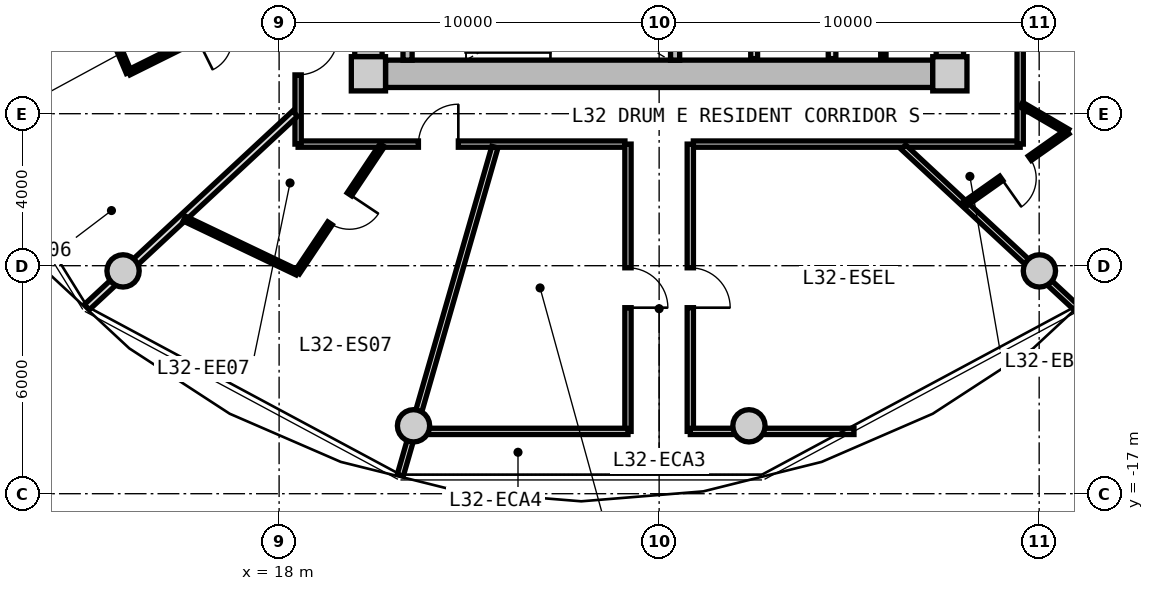
"""IFC4 building model, lengths in metres.
Left out: names, types, materials, properties, quantities, classifications, styles, units other than length and angle.
Written with IfcOpenShell. Run it as: python <this file> out.ifc"""

import sys

from ifc_helpers import new_model, si_unit, direction, frame, frame_2d, origin, origin_2d, place, context, subcontext, project, spatial, rectangle, circle, extrude, source, transform, mapped, element, fill, save


model = new_model("IFC4")
c1 = context("Model", 3, precision=1e-05, world=origin(), true_north=direction((0.0, 1.0)))
c2 = subcontext(c1, "Body", "Model", "MODEL_VIEW")
j1 = project(units=[si_unit("LENGTHUNIT", "METRE"), si_unit("PLANEANGLEUNIT", "RADIAN")], contexts=[c1])
p1 = place(None, origin())
s1 = spatial("IfcSite", under=j1, at=p1, CompositionType="ELEMENT")
p2 = place(p1, origin())
s2 = spatial("IfcBuilding", under=s1, at=p2, CompositionType="ELEMENT")
p3 = place(p2, frame((0.0, 0.0, 105.4)))
s3 = spatial("IfcBuildingStorey", under=s2, at=p3, CompositionType="ELEMENT", Elevation=105.4)
m1 = source(origin(), c2, "Body", "SweptSolid", [
    extrude(rectangle(XDim=0.9, YDim=0.9, at=origin_2d()), origin(), (0.0, 0.0, 1.0), 3.05),
])
for number, where, z_axis, x_axis in (
    (1, (20.35, -5.95, 0.0), (0.0, 0.0, 1.0), (1.0, 0.0, 0.0)),
    (2, (35.65, -5.95, 0.0), (0.0, 0.0, 1.0), (1.0, 0.0, 0.0)),
):
    element("IfcColumn", number, at=place(p3, frame(where, z_axis=z_axis, x_axis=x_axis)), inside=s3, PredefinedType="COLUMN", context=c2, shape_type="MappedRepresentation", body=[
        mapped(m1, transform((0.0, 0.0, 0.0), x_axis=(1.0, 0.0, 0.0), y_axis=(0.0, 1.0, 0.0), z_axis=(0.0, 0.0, 1.0), scale=1.0)),
    ])
m2 = source(origin(), c2, "Body", "SweptSolid", [
    extrude(rectangle(XDim=14.4, YDim=0.72, at=frame_2d((7.2, 0.0))), origin(), (0.0, 0.0, 1.0), 2.79),
])
p4 = place(p3, frame((35.2, -5.95, 0.0), z_axis=(0.0, 0.0, 1.0), x_axis=(-1.0, 0.0, 0.0)))
e3 = element("IfcWall", 3, at=p4, inside=s3, PredefinedType="SHEAR", context=c2, shape_type="MappedRepresentation", body=[
    mapped(m2, transform((0.0, 0.0, 0.0), x_axis=(1.0, 0.0, 0.0), y_axis=(0.0, 1.0, 0.0), z_axis=(0.0, 0.0, 1.0), scale=1.0)),
])
m3 = source(origin(), c2, "Body", "SweptSolid", [
    extrude(rectangle(XDim=11.0, YDim=0.72, at=frame_2d((5.5, 0.0))), origin(), (0.0, 0.0, 1.0), 2.79),
])
p5 = place(p3, frame((20.35, -5.5, 0.0), z_axis=(0.0, 0.0, 1.0), x_axis=(0.0, 1.0, 0.0)))
e4 = element("IfcWall", 4, at=p5, inside=s3, PredefinedType="SHEAR", context=c2, shape_type="MappedRepresentation", body=[
    mapped(m3, transform((0.0, 0.0, 0.0), x_axis=(1.0, 0.0, 0.0), y_axis=(0.0, 1.0, 0.0), z_axis=(0.0, 0.0, 1.0), scale=1.0)),
])
p6 = place(p5, frame((3.8, 0.0, 0.0)))
e5 = element("IfcOpeningElement", 5, at=p6, cuts=e4, PredefinedType="OPENING", context=c2, shape_type="SweptSolid", body=[
    extrude(rectangle(XDim=1.2, YDim=2.15, at=frame_2d((0.6, 1.075))), frame((0.0, 0.37, 0.0), z_axis=(0.0, -1.0, 0.0), x_axis=(1.0, 0.0, 0.0)), (0.0, 0.0, 1.0), 0.74),
])
p7 = place(p3, frame((35.65, 5.5, 0.0), z_axis=(0.0, 0.0, 1.0), x_axis=(0.0, -1.0, 0.0)))
e6 = element("IfcWall", 6, at=p7, inside=s3, PredefinedType="SHEAR", context=c2, shape_type="MappedRepresentation", body=[
    mapped(m3, transform((0.0, 0.0, 0.0), x_axis=(1.0, 0.0, 0.0), y_axis=(0.0, 1.0, 0.0), z_axis=(0.0, 0.0, 1.0), scale=1.0)),
])
p8 = place(p7, frame((5.65, 0.0, 0.0)))
e7 = element("IfcOpeningElement", 7, at=p8, cuts=e6, PredefinedType="OPENING", context=c2, shape_type="SweptSolid", body=[
    extrude(rectangle(XDim=1.2, YDim=2.15, at=frame_2d((0.6, 1.075))), frame((0.0, 0.37, 0.0), z_axis=(0.0, -1.0, 0.0), x_axis=(1.0, 0.0, 0.0)), (0.0, 0.0, 1.0), 0.74),
])
m4 = source(origin(), c2, "Body", "SweptSolid", [
    extrude(circle(Radius=0.425, at=origin_2d()), origin(), (0.0, 0.0, 1.0), 3.05),
])
for number, where, z_axis, x_axis in (
    (8, (13.894, -11.137, 0.0), (0.0, 0.0, 1.0), (1.0, 0.0, 0.0)),
    (9, (21.537, -15.213, 0.0), (0.0, 0.0, 1.0), (1.0, 0.0, 0.0)),
    (10, (30.363, -15.213, 0.0), (0.0, 0.0, 1.0), (1.0, 0.0, 0.0)),
    (11, (38.006, -11.137, 0.0), (0.0, 0.0, 1.0), (1.0, 0.0, 0.0)),
):
    element("IfcColumn", number, at=place(p3, frame(where, z_axis=z_axis, x_axis=x_axis)), inside=s3, PredefinedType="COLUMN", context=c2, shape_type="MappedRepresentation", body=[
        mapped(m4, transform((0.0, 0.0, 0.0), x_axis=(1.0, 0.0, 0.0), y_axis=(0.0, 1.0, 0.0), z_axis=(0.0, 0.0, 1.0), scale=1.0)),
    ])
m5 = source(origin(), c2, "Body", "SweptSolid", [
    extrude(rectangle(XDim=3.14, YDim=0.24, at=frame_2d((1.57, 0.0))), origin(), (0.0, 0.0, 1.0), 2.79),
])
for number, where, z_axis, x_axis in (
    (12, (21.38, -5.59, 0.0), (0.0, 0.0, 1.0), (0.0, 1.0, 0.0)),
    (13, (28.42, -5.59, 0.0), (0.0, 0.0, 1.0), (0.0, 1.0, 0.0)),
):
    element("IfcWall", number, at=place(p3, frame(where, z_axis=z_axis, x_axis=x_axis)), inside=s3, PredefinedType="PARTITIONING", context=c2, shape_type="MappedRepresentation", body=[
        mapped(m5, transform((0.0, 0.0, 0.0), x_axis=(1.0, 0.0, 0.0), y_axis=(0.0, 1.0, 0.0), z_axis=(0.0, 0.0, 1.0), scale=1.0)),
    ])
m6 = source(origin(), c2, "Body", "SweptSolid", [
    extrude(rectangle(XDim=3.8, YDim=0.2, at=frame_2d((1.9, 0.0))), origin(), (0.0, 0.0, 1.0), 2.775),
])
p9 = place(p3, frame((32.55, -5.55, 0.0), z_axis=(0.0, 0.0, 1.0), x_axis=(0.0, 1.0, 0.0)))
e14 = element("IfcWall", 14, at=p9, inside=s3, PredefinedType="PARTITIONING", context=c2, shape_type="MappedRepresentation", body=[
    mapped(m6, transform((0.0, 0.0, 0.0), x_axis=(1.0, 0.0, 0.0), y_axis=(0.0, 1.0, 0.0), z_axis=(0.0, 0.0, 1.0), scale=1.0)),
])
m7 = source(origin(), c2, "Body", "SweptSolid", [
    extrude(rectangle(XDim=3.22, YDim=0.18, at=frame_2d((1.61, 0.0))), origin(), (0.0, 0.0, 1.0), 2.775),
])
p10 = place(p3, frame((30.5, -5.55, 0.0), z_axis=(0.0, 0.0, 1.0), x_axis=(0.0, 1.0, 0.0)))
e15 = element("IfcWall", 15, at=p10, inside=s3, PredefinedType="PARTITIONING", context=c2, shape_type="MappedRepresentation", body=[
    mapped(m7, transform((0.0, 0.0, 0.0), x_axis=(1.0, 0.0, 0.0), y_axis=(0.0, 1.0, 0.0), z_axis=(0.0, 0.0, 1.0), scale=1.0)),
])
m8 = source(origin(), c2, "Body", "SweptSolid", [
    extrude(rectangle(XDim=3.8, YDim=0.14, at=frame_2d((1.9, 0.0))), origin(), (0.0, 0.0, 1.0), 2.775),
])
p11 = place(p3, frame((33.9, -5.55, 0.0), z_axis=(0.0, 0.0, 1.0), x_axis=(0.0, 1.0, 0.0)))
e16 = element("IfcWall", 16, at=p11, inside=s3, PredefinedType="PARTITIONING", context=c2, shape_type="MappedRepresentation", body=[
    mapped(m8, transform((0.0, 0.0, 0.0), x_axis=(1.0, 0.0, 0.0), y_axis=(0.0, 1.0, 0.0), z_axis=(0.0, 0.0, 1.0), scale=1.0)),
])
m9 = source(origin(), c2, "Body", "SweptSolid", [
    extrude(rectangle(XDim=8.6, YDim=0.165, at=frame_2d((4.3, 0.0))), origin(), (0.0, 0.0, 1.0), 2.775),
])
p12 = place(p3, frame((37.5, -7.8, 0.0), z_axis=(0.0, 0.0, 1.0), x_axis=(-1.0, 0.0, 0.0)))
e17 = element("IfcWall", 17, at=p12, inside=s3, PredefinedType="PARTITIONING", context=c2, shape_type="MappedRepresentation", body=[
    mapped(m9, transform((0.0, 0.0, 0.0), x_axis=(1.0, 0.0, 0.0), y_axis=(0.0, 1.0, 0.0), z_axis=(0.0, 0.0, 1.0), scale=1.0)),
])
p13 = place(p3, frame((27.1, -7.8, 0.0), z_axis=(0.0, 0.0, 1.0), x_axis=(-1.0, 0.0, 0.0)))
e18 = element("IfcWall", 18, at=p13, inside=s3, PredefinedType="PARTITIONING", context=c2, shape_type="MappedRepresentation", body=[
    mapped(m9, transform((0.0, 0.0, 0.0), x_axis=(1.0, 0.0, 0.0), y_axis=(0.0, 1.0, 0.0), z_axis=(0.0, 0.0, 1.0), scale=1.0)),
])
p14 = place(p13, frame((4.384, 0.0, 0.0)))
e19 = element("IfcOpeningElement", 19, at=p14, cuts=e18, PredefinedType="OPENING", context=c2, shape_type="SweptSolid", body=[
    extrude(rectangle(XDim=1.05, YDim=2.15, at=frame_2d((0.525, 1.075))), frame((0.0, 0.093, 0.0), z_axis=(0.0, -1.0, 0.0), x_axis=(1.0, 0.0, 0.0)), (0.0, 0.0, 1.0), 0.185),
])
m10 = source(origin(), c2, "Body", "SweptSolid", [
    extrude(rectangle(XDim=15.6, YDim=0.165, at=frame_2d((7.8, 0.0))), origin(), (0.0, 0.0, 1.0), 2.775),
])
p15 = place(p3, frame((18.5, -7.8, 0.0), z_axis=(0.0, 0.0, 1.0), x_axis=(0.0, 1.0, 0.0)))
e20 = element("IfcWall", 20, at=p15, inside=s3, PredefinedType="PARTITIONING", context=c2, shape_type="MappedRepresentation", body=[
    mapped(m10, transform((0.0, 0.0, 0.0), x_axis=(1.0, 0.0, 0.0), y_axis=(0.0, 1.0, 0.0), z_axis=(0.0, 0.0, 1.0), scale=1.0)),
])
p16 = place(p15, frame((10.383, 0.0, 0.0)))
e21 = element("IfcOpeningElement", 21, at=p16, cuts=e20, PredefinedType="OPENING", context=c2, shape_type="SweptSolid", body=[
    extrude(rectangle(XDim=1.05, YDim=2.15, at=frame_2d((0.525, 1.075))), frame((0.0, 0.093, 0.0), z_axis=(0.0, -1.0, 0.0), x_axis=(1.0, 0.0, 0.0)), (0.0, 0.0, 1.0), 0.185),
])
p17 = place(p15, frame((6.419, 0.0, 0.0)))
e22 = element("IfcOpeningElement", 22, at=p17, cuts=e20, PredefinedType="OPENING", context=c2, shape_type="SweptSolid", body=[
    extrude(rectangle(XDim=1.05, YDim=2.15, at=frame_2d((0.525, 1.075))), frame((0.0, 0.093, 0.0), z_axis=(0.0, -1.0, 0.0), x_axis=(1.0, 0.0, 0.0)), (0.0, 0.0, 1.0), 0.185),
])
p18 = place(p15, frame((1.821, 0.0, 0.0)))
e23 = element("IfcOpeningElement", 23, at=p18, cuts=e20, PredefinedType="OPENING", context=c2, shape_type="SweptSolid", body=[
    extrude(rectangle(XDim=1.05, YDim=2.15, at=frame_2d((0.525, 1.075))), frame((0.0, 0.093, 0.0), z_axis=(0.0, -1.0, 0.0), x_axis=(1.0, 0.0, 0.0)), (0.0, 0.0, 1.0), 0.185),
])
p19 = place(p3, frame((37.5, 7.8, 0.0), z_axis=(0.0, 0.0, 1.0), x_axis=(0.0, -1.0, 0.0)))
e24 = element("IfcWall", 24, at=p19, inside=s3, PredefinedType="PARTITIONING", context=c2, shape_type="MappedRepresentation", body=[
    mapped(m10, transform((0.0, 0.0, 0.0), x_axis=(1.0, 0.0, 0.0), y_axis=(0.0, 1.0, 0.0), z_axis=(0.0, 0.0, 1.0), scale=1.0)),
])
p20 = place(p19, frame((6.87, 0.0, 0.0)))
e25 = element("IfcOpeningElement", 25, at=p20, cuts=e24, PredefinedType="OPENING", context=c2, shape_type="SweptSolid", body=[
    extrude(rectangle(XDim=1.05, YDim=2.15, at=frame_2d((0.525, 1.075))), frame((0.0, 0.093, 0.0), z_axis=(0.0, -1.0, 0.0), x_axis=(1.0, 0.0, 0.0)), (0.0, 0.0, 1.0), 0.185),
])
m11 = source(origin(), c2, "Body", "SweptSolid", [
    extrude(rectangle(XDim=8.989, YDim=0.165, at=frame_2d((4.495, 0.0))), origin(), (0.0, 0.0, 1.0), 2.275),
])
p21 = place(p3, frame((23.678, -7.88, 0.0), z_axis=(0.0, 0.0, 1.0), x_axis=(-0.27702323008, -0.960863221274, 0.0)))
e26 = element("IfcWall", 26, at=p21, inside=s3, PredefinedType="PARTITIONING", context=c2, shape_type="MappedRepresentation", body=[
    mapped(m11, transform((0.0, 0.0, 0.0), x_axis=(1.0, 0.0, 0.0), y_axis=(0.0, 1.0, 0.0), z_axis=(0.0, 0.0, 1.0), scale=1.0)),
])
m12 = source(origin(), c2, "Body", "SweptSolid", [
    extrude(rectangle(XDim=6.187, YDim=0.165, at=frame_2d((3.093, 0.0))), origin(), (0.0, 0.0, 1.0), 2.275),
])
p22 = place(p3, frame((34.429, -7.88, 0.0), z_axis=(0.0, 0.0, 1.0), x_axis=(0.732501077882, -0.680765870841, 0.0)))
e27 = element("IfcWall", 27, at=p22, inside=s3, PredefinedType="PARTITIONING", context=c2, shape_type="MappedRepresentation", body=[
    mapped(m12, transform((0.0, 0.0, 0.0), x_axis=(1.0, 0.0, 0.0), y_axis=(0.0, 1.0, 0.0), z_axis=(0.0, 0.0, 1.0), scale=1.0)),
])
m13 = source(origin(), c2, "Body", "SweptSolid", [
    extrude(rectangle(XDim=7.56, YDim=0.165, at=frame_2d((3.78, 0.0))), origin(), (0.0, 0.0, 1.0), 2.775),
])
p23 = place(p3, frame((27.18, -15.36, 0.0), z_axis=(0.0, 0.0, 1.0), x_axis=(0.0, 1.0, 0.0)))
e28 = element("IfcWall", 28, at=p23, inside=s3, PredefinedType="PARTITIONING", context=c2, shape_type="MappedRepresentation", body=[
    mapped(m13, transform((0.0, 0.0, 0.0), x_axis=(1.0, 0.0, 0.0), y_axis=(0.0, 1.0, 0.0), z_axis=(0.0, 0.0, 1.0), scale=1.0)),
])
p24 = place(p23, frame((3.255, 0.0, 0.0)))
e29 = element("IfcOpeningElement", 29, at=p24, cuts=e28, PredefinedType="OPENING", context=c2, shape_type="SweptSolid", body=[
    extrude(rectangle(XDim=1.05, YDim=2.15, at=frame_2d((0.525, 1.075))), frame((0.0, 0.093, 0.0), z_axis=(0.0, -1.0, 0.0), x_axis=(1.0, 0.0, 0.0)), (0.0, 0.0, 1.0), 0.185),
])
m14 = source(origin(), c2, "Body", "SweptSolid", [
    extrude(rectangle(XDim=5.814, YDim=0.165, at=frame_2d((2.907, 0.0))), origin(), (0.0, 0.0, 1.0), 2.275),
])
p25 = place(p3, frame((21.366, -15.36, 0.0), z_axis=(0.0, 0.0, 1.0), x_axis=(1.0, 0.0, 0.0)))
e30 = element("IfcWall", 30, at=p25, inside=s3, PredefinedType="PARTITIONING", context=c2, shape_type="MappedRepresentation", body=[
    mapped(m14, transform((0.0, 0.0, 0.0), x_axis=(1.0, 0.0, 0.0), y_axis=(0.0, 1.0, 0.0), z_axis=(0.0, 0.0, 1.0), scale=1.0)),
])
p26 = place(p3, frame((28.82, -15.36, 0.0), z_axis=(0.0, 0.0, 1.0), x_axis=(0.0, 1.0, 0.0)))
e31 = element("IfcWall", 31, at=p26, inside=s3, PredefinedType="PARTITIONING", context=c2, shape_type="MappedRepresentation", body=[
    mapped(m13, transform((0.0, 0.0, 0.0), x_axis=(1.0, 0.0, 0.0), y_axis=(0.0, 1.0, 0.0), z_axis=(0.0, 0.0, 1.0), scale=1.0)),
])
p27 = place(p26, frame((3.255, 0.0, 0.0)))
e32 = element("IfcOpeningElement", 32, at=p27, cuts=e31, PredefinedType="OPENING", context=c2, shape_type="SweptSolid", body=[
    extrude(rectangle(XDim=1.05, YDim=2.15, at=frame_2d((0.525, 1.075))), frame((0.0, 0.093, 0.0), z_axis=(0.0, -1.0, 0.0), x_axis=(1.0, 0.0, 0.0)), (0.0, 0.0, 1.0), 0.185),
])
m15 = source(origin(), c2, "Body", "SweptSolid", [
    extrude(rectangle(XDim=4.307, YDim=0.165, at=frame_2d((2.153, 0.0))), origin(), (0.0, 0.0, 1.0), 2.275),
])
p28 = place(p3, frame((28.82, -15.36, 0.0), z_axis=(0.0, 0.0, 1.0), x_axis=(1.0, 0.0, 0.0)))
e33 = element("IfcWall", 33, at=p28, inside=s3, PredefinedType="PARTITIONING", context=c2, shape_type="MappedRepresentation", body=[
    mapped(m15, transform((0.0, 0.0, 0.0), x_axis=(1.0, 0.0, 0.0), y_axis=(0.0, 1.0, 0.0), z_axis=(0.0, 0.0, 1.0), scale=1.0)),
])
m16 = source(origin(), c2, "Body", "SweptSolid", [
    extrude(rectangle(XDim=7.482, YDim=0.19, at=frame_2d((3.741, 0.0))), origin(), (0.0, 0.0, 1.0), 2.275),
])
p29 = place(p3, frame((18.42, -6.998, 0.0), z_axis=(0.0, 0.0, 1.0), x_axis=(-0.732508698043, -0.680757671489, 0.0)))
e34 = element("IfcWall", 34, at=p29, inside=s3, PredefinedType="PARTITIONING", context=c2, shape_type="MappedRepresentation", body=[
    mapped(m16, transform((0.0, 0.0, 0.0), x_axis=(1.0, 0.0, 0.0), y_axis=(0.0, 1.0, 0.0), z_axis=(0.0, 0.0, 1.0), scale=1.0)),
])
m17 = source(origin(), c2, "Body", "SweptSolid", [
    extrude(rectangle(XDim=4.941, YDim=0.14, at=frame_2d((2.471, 0.0))), origin(), (0.0, 0.0, 1.0), 2.775),
])
p30 = place(p3, frame((18.47, -3.717, 0.0), z_axis=(0.0, 0.0, 1.0), x_axis=(-0.89555083256, -0.444959218694, 0.0)))
e35 = element("IfcWall", 35, at=p30, inside=s3, PredefinedType="PARTITIONING", context=c2, shape_type="MappedRepresentation", body=[
    mapped(m17, transform((0.0, 0.0, 0.0), x_axis=(1.0, 0.0, 0.0), y_axis=(0.0, 1.0, 0.0), z_axis=(0.0, 0.0, 1.0), scale=1.0)),
])
p31 = place(p30, frame((2.011, 0.0, 0.0)))
e36 = element("IfcOpeningElement", 36, at=p31, cuts=e35, PredefinedType="OPENING", context=c2, shape_type="SweptSolid", body=[
    extrude(rectangle(XDim=0.92, YDim=2.1, at=frame_2d((0.46, 1.05))), frame((0.0, 0.08, 0.0), z_axis=(0.0, -1.0, 0.0), x_axis=(1.0, 0.0, 0.0)), (0.0, 0.0, 1.0), 0.16),
])
m18 = source(origin(), c2, "Body", "SweptSolid", [
    extrude(rectangle(XDim=2.88, YDim=0.14, at=frame_2d((1.44, 0.0))), origin(), (0.0, 0.0, 1.0), 2.415),
])
p32 = place(p3, frame((14.045, -5.915, 0.0), z_axis=(0.0, 0.0, 1.0), x_axis=(-0.38878819597, 0.921327161585, 0.0)))
e37 = element("IfcWall", 37, at=p32, inside=s3, PredefinedType="PARTITIONING", context=c2, shape_type="MappedRepresentation", body=[
    mapped(m18, transform((0.0, 0.0, 0.0), x_axis=(1.0, 0.0, 0.0), y_axis=(0.0, 1.0, 0.0), z_axis=(0.0, 0.0, 1.0), scale=1.0)),
])
m19 = source(origin(), c2, "Body", "SweptSolid", [
    extrude(rectangle(XDim=4.027, YDim=0.14, at=frame_2d((2.014, 0.0))), origin(), (0.0, 0.0, 1.0), 2.775),
])
p33 = place(p3, frame((20.714, -7.83, 0.0), z_axis=(0.0, 0.0, 1.0), x_axis=(-0.555832825922, -0.831294093343, 0.0)))
e38 = element("IfcWall", 38, at=p33, inside=s3, PredefinedType="PARTITIONING", context=c2, shape_type="MappedRepresentation", body=[
    mapped(m19, transform((0.0, 0.0, 0.0), x_axis=(1.0, 0.0, 0.0), y_axis=(0.0, 1.0, 0.0), z_axis=(0.0, 0.0, 1.0), scale=1.0)),
])
p34 = place(p33, frame((1.554, 0.0, 0.0)))
e39 = element("IfcOpeningElement", 39, at=p34, cuts=e38, PredefinedType="OPENING", context=c2, shape_type="SweptSolid", body=[
    extrude(rectangle(XDim=0.92, YDim=2.1, at=frame_2d((0.46, 1.05))), frame((0.0, 0.08, 0.0), z_axis=(0.0, -1.0, 0.0), x_axis=(1.0, 0.0, 0.0)), (0.0, 0.0, 1.0), 0.16),
])
m20 = source(origin(), c2, "Body", "SweptSolid", [
    extrude(rectangle(XDim=3.291, YDim=0.14, at=frame_2d((1.646, 0.0))), origin(), (0.0, 0.0, 1.0), 2.775),
])
p35 = place(p3, frame((18.476, -11.178, 0.0), z_axis=(0.0, 0.0, 1.0), x_axis=(-0.902381393443, 0.430938302739, 0.0)))
e40 = element("IfcWall", 40, at=p35, inside=s3, PredefinedType="PARTITIONING", context=c2, shape_type="MappedRepresentation", body=[
    mapped(m20, transform((0.0, 0.0, 0.0), x_axis=(1.0, 0.0, 0.0), y_axis=(0.0, 1.0, 0.0), z_axis=(0.0, 0.0, 1.0), scale=1.0)),
])
m21 = source(origin(), c2, "Body", "SweptSolid", [
    extrude(rectangle(XDim=1.407, YDim=0.14, at=frame_2d((0.704, 0.0))), origin(), (0.0, 0.0, 1.0), 2.775),
])
p36 = place(p3, frame((37.53, -6.762, 0.0), z_axis=(0.0, 0.0, 1.0), x_axis=(0.863539718977, -0.504280828258, 0.0)))
e41 = element("IfcWall", 41, at=p36, inside=s3, PredefinedType="PARTITIONING", context=c2, shape_type="MappedRepresentation", body=[
    mapped(m21, transform((0.0, 0.0, 0.0), x_axis=(1.0, 0.0, 0.0), y_axis=(0.0, 1.0, 0.0), z_axis=(0.0, 0.0, 1.0), scale=1.0)),
])
m22 = source(origin(), c2, "Body", "SweptSolid", [
    extrude(rectangle(XDim=3.347, YDim=0.14, at=frame_2d((1.673, 0.0))), origin(), (0.0, 0.0, 1.0), 2.775),
])
p37 = place(p3, frame((38.745, -7.472, 0.0), z_axis=(0.0, 0.0, 1.0), x_axis=(-0.81705680263, -0.576557179537, 0.0)))
e42 = element("IfcWall", 42, at=p37, inside=s3, PredefinedType="PARTITIONING", context=c2, shape_type="MappedRepresentation", body=[
    mapped(m22, transform((0.0, 0.0, 0.0), x_axis=(1.0, 0.0, 0.0), y_axis=(0.0, 1.0, 0.0), z_axis=(0.0, 0.0, 1.0), scale=1.0)),
])
p38 = place(p37, frame((1.214, 0.0, 0.0)))
e43 = element("IfcOpeningElement", 43, at=p38, cuts=e42, PredefinedType="OPENING", context=c2, shape_type="SweptSolid", body=[
    extrude(rectangle(XDim=0.92, YDim=2.1, at=frame_2d((0.46, 1.05))), frame((0.0, 0.08, 0.0), z_axis=(0.0, -1.0, 0.0), x_axis=(1.0, 0.0, 0.0)), (0.0, 0.0, 1.0), 0.16),
])
m23 = source(origin(), c2, "Body", "SweptSolid", [
    extrude(rectangle(XDim=1.05, YDim=2.15, at=frame_2d((0.525, 1.075))), frame((0.0, 0.025, 0.0), z_axis=(0.0, -1.0, 0.0), x_axis=(1.0, 0.0, 0.0)), (0.0, 0.0, 1.0), 0.05),
])
p39 = place(p24, frame((1.05, 0.0, 0.0), z_axis=(0.0, 0.0, 1.0), x_axis=(-1.0, 0.0, 0.0)))
e44 = element("IfcDoor", 44, at=p39, inside=s3, OperationType="SINGLE_SWING_RIGHT", PredefinedType="DOOR", context=c2, shape_type="MappedRepresentation", body=[
    mapped(m23, transform((0.0, 0.0, 0.0), x_axis=(1.0, 0.0, 0.0), y_axis=(0.0, 1.0, 0.0), z_axis=(0.0, 0.0, 1.0), scale=1.0)),
])
fill(e29, e44)
p40 = place(p27, frame((1.05, 0.0, 0.0), z_axis=(0.0, 0.0, 1.0), x_axis=(-1.0, 0.0, 0.0)))
e45 = element("IfcDoor", 45, at=p40, inside=s3, OperationType="SINGLE_SWING_RIGHT", PredefinedType="DOOR", context=c2, shape_type="MappedRepresentation", body=[
    mapped(m23, transform((0.0, 0.0, 0.0), x_axis=(1.0, 0.0, 0.0), y_axis=(0.0, 1.0, 0.0), z_axis=(0.0, 0.0, 1.0), scale=1.0)),
])
fill(e32, e45)
p41 = place(p18, frame((1.05, 0.0, 0.0), z_axis=(0.0, 0.0, 1.0), x_axis=(-1.0, 0.0, 0.0)))
e46 = element("IfcDoor", 46, at=p41, inside=s3, OperationType="SINGLE_SWING_LEFT", PredefinedType="DOOR", context=c2, shape_type="MappedRepresentation", body=[
    mapped(m23, transform((0.0, 0.0, 0.0), x_axis=(1.0, 0.0, 0.0), y_axis=(0.0, 1.0, 0.0), z_axis=(0.0, 0.0, 1.0), scale=1.0)),
])
fill(e23, e46)
p42 = place(p14, frame((1.05, 0.0, 0.0), z_axis=(0.0, 0.0, 1.0), x_axis=(-1.0, 0.0, 0.0)))
e47 = element("IfcDoor", 47, at=p42, inside=s3, OperationType="SINGLE_SWING_RIGHT", PredefinedType="DOOR", context=c2, shape_type="MappedRepresentation", body=[
    mapped(m23, transform((0.0, 0.0, 0.0), x_axis=(1.0, 0.0, 0.0), y_axis=(0.0, 1.0, 0.0), z_axis=(0.0, 0.0, 1.0), scale=1.0)),
])
fill(e19, e47)
m24 = source(origin(), c2, "Body", "SweptSolid", [
    extrude(rectangle(XDim=0.92, YDim=2.1, at=frame_2d((0.46, 1.05))), frame((0.0, 0.025, 0.0), z_axis=(0.0, -1.0, 0.0), x_axis=(1.0, 0.0, 0.0)), (0.0, 0.0, 1.0), 0.05),
])
p43 = place(p34, origin())
e48 = element("IfcDoor", 48, at=p43, inside=s3, OperationType="SINGLE_SWING_LEFT", PredefinedType="DOOR", context=c2, shape_type="MappedRepresentation", body=[
    mapped(m24, transform((0.0, 0.0, 0.0), x_axis=(1.0, 0.0, 0.0), y_axis=(0.0, 1.0, 0.0), z_axis=(0.0, 0.0, 1.0), scale=1.0)),
])
fill(e39, e48)
p44 = place(p38, origin())
e49 = element("IfcDoor", 49, at=p44, inside=s3, OperationType="SINGLE_SWING_RIGHT", PredefinedType="DOOR", context=c2, shape_type="MappedRepresentation", body=[
    mapped(m24, transform((0.0, 0.0, 0.0), x_axis=(1.0, 0.0, 0.0), y_axis=(0.0, 1.0, 0.0), z_axis=(0.0, 0.0, 1.0), scale=1.0)),
])
fill(e43, e49)
save(model, sys.argv[1])
